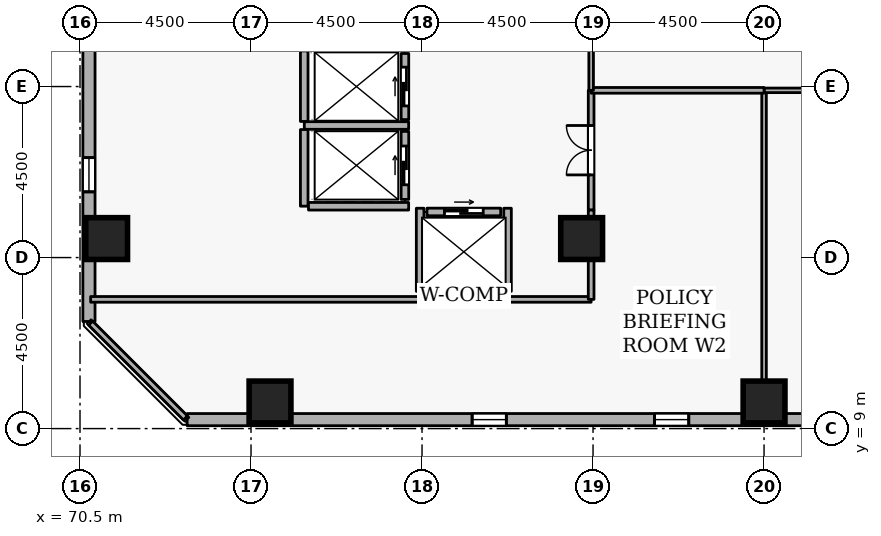
"""IFC4 building model, lengths in metres.
Left out: names, types, materials, properties, quantities, classifications, styles, units other than length and angle.
Written with IfcOpenShell. Run it as: python <this file> out.ifc"""

import sys

from ifc_helpers import new_model, si_unit, direction, frame, frame_2d, origin, origin_2d, place, context, subcontext, project, spatial, rectangle, extrude, element, fill, save


model = new_model("IFC4")
c1 = context("Model", 3, precision=1e-05, world=origin(), true_north=direction((0.0, 1.0)))
c2 = subcontext(c1, "Body", "Model", "MODEL_VIEW")
j1 = project(units=[si_unit("LENGTHUNIT", "METRE"), si_unit("PLANEANGLEUNIT", "RADIAN")], contexts=[c1])
p1 = place(None, origin())
s1 = spatial("IfcSite", under=j1, at=p1, CompositionType="ELEMENT")
p2 = place(p1, origin())
s2 = spatial("IfcBuilding", under=s1, at=p2, CompositionType="ELEMENT")
p3 = place(p2, frame((0.0, 0.0, 163.5)))
s3 = spatial("IfcBuildingStorey", under=s2, at=p3, CompositionType="ELEMENT", Elevation=163.5)
for number, where, z_axis, x_axis in (
    (1, (71.2, 14.0, 0.0), (0.0, 0.0, 1.0), (1.0, 0.0, 0.0)),
    (2, (88.5, 9.7, 0.0), (0.0, 0.0, 1.0), (1.0, 0.0, 0.0)),
    (3, (75.5, 9.7, 0.0), (0.0, 0.0, 1.0), (1.0, 0.0, 0.0)),
    (4, (83.7, 14.0, 0.0), (0.0, 0.0, 1.0), (1.0, 0.0, 0.0)),
):
    element("IfcColumn", number, at=place(p3, frame(where, z_axis=z_axis, x_axis=x_axis)), inside=s3, PredefinedType="COLUMN", context=c2, shape_type="SweptSolid", body=[
        extrude(rectangle(XDim=1.1, YDim=1.1, at=origin_2d()), origin(), (0.0, 0.0, 1.0), 3.6),
    ])
p4 = place(p3, frame((73.319, 9.235, 0.0), z_axis=(0.0, 0.0, 1.0), x_axis=(0.999999998513, 5.4540124e-05, 0.0)))
e5 = element("IfcWall", 5, at=p4, inside=s3, PredefinedType="STANDARD", context=c2, shape_type="SweptSolid", body=[
    extrude(rectangle(XDim=35.811, YDim=0.32, at=frame_2d((17.905, 0.0))), origin(), (0.0, 0.0, 1.0), 2.7),
])
p5 = place(p4, frame((7.5, 0.0, 0.72)))
e6 = element("IfcOpeningElement", 6, at=p5, cuts=e5, PredefinedType="OPENING", context=c2, shape_type="SweptSolid", body=[
    extrude(rectangle(XDim=0.9, YDim=1.75, at=frame_2d((0.45, 0.875))), frame((0.0, 0.17, 0.0), z_axis=(0.0, -1.0, 0.0), x_axis=(1.0, 0.0, 0.0)), (0.0, 0.0, 1.0), 0.34),
])
p6 = place(p4, frame((12.3, 0.0, 0.72)))
e7 = element("IfcOpeningElement", 7, at=p6, cuts=e5, PredefinedType="OPENING", context=c2, shape_type="SweptSolid", body=[
    extrude(rectangle(XDim=0.9, YDim=1.75, at=frame_2d((0.45, 0.875))), frame((0.0, 0.17, 0.0), z_axis=(0.0, -1.0, 0.0), x_axis=(1.0, 0.0, 0.0)), (0.0, 0.0, 1.0), 0.34),
])
p7 = place(p4, frame((17.1, 0.0, 0.72)))
e8 = element("IfcOpeningElement", 8, at=p7, cuts=e5, PredefinedType="OPENING", context=c2, shape_type="SweptSolid", body=[
    extrude(rectangle(XDim=0.9, YDim=1.75, at=frame_2d((0.45, 0.875))), frame((0.0, 0.17, 0.0), z_axis=(0.0, -1.0, 0.0), x_axis=(1.0, 0.0, 0.0)), (0.0, 0.0, 1.0), 0.34),
])
p8 = place(p4, frame((21.9, 0.0, 0.72)))
e9 = element("IfcOpeningElement", 9, at=p8, cuts=e5, PredefinedType="OPENING", context=c2, shape_type="SweptSolid", body=[
    extrude(rectangle(XDim=0.9, YDim=1.75, at=frame_2d((0.45, 0.875))), frame((0.0, 0.17, 0.0), z_axis=(0.0, -1.0, 0.0), x_axis=(1.0, 0.0, 0.0)), (0.0, 0.0, 1.0), 0.34),
])
p9 = place(p4, frame((31.5, 0.0, 0.72)))
e10 = element("IfcOpeningElement", 10, at=p9, cuts=e5, PredefinedType="OPENING", context=c2, shape_type="SweptSolid", body=[
    extrude(rectangle(XDim=0.9, YDim=1.75, at=frame_2d((0.45, 0.875))), frame((0.0, 0.17, 0.0), z_axis=(0.0, -1.0, 0.0), x_axis=(1.0, 0.0, 0.0)), (0.0, 0.0, 1.0), 0.34),
])
p10 = place(p3, frame((70.737, 47.629, 0.0), z_axis=(0.0, 0.0, 1.0), x_axis=(-5.4540124e-05, -0.999999998513, 0.0)))
e11 = element("IfcWall", 11, at=p10, inside=s3, PredefinedType="STANDARD", context=c2, shape_type="SweptSolid", body=[
    extrude(rectangle(XDim=35.811, YDim=0.32, at=frame_2d((17.905, 0.0))), origin(), (0.0, 0.0, 1.0), 2.7),
])
p11 = place(p10, frame((2.7, 0.0, 0.72)))
e12 = element("IfcOpeningElement", 12, at=p11, cuts=e11, PredefinedType="OPENING", context=c2, shape_type="SweptSolid", body=[
    extrude(rectangle(XDim=0.9, YDim=1.75, at=frame_2d((0.45, 0.875))), frame((0.0, 0.17, 0.0), z_axis=(0.0, -1.0, 0.0), x_axis=(1.0, 0.0, 0.0)), (0.0, 0.0, 1.0), 0.34),
])
p12 = place(p10, frame((12.3, 0.0, 0.72)))
e13 = element("IfcOpeningElement", 13, at=p12, cuts=e11, PredefinedType="OPENING", context=c2, shape_type="SweptSolid", body=[
    extrude(rectangle(XDim=0.9, YDim=1.75, at=frame_2d((0.45, 0.875))), frame((0.0, 0.17, 0.0), z_axis=(0.0, -1.0, 0.0), x_axis=(1.0, 0.0, 0.0)), (0.0, 0.0, 1.0), 0.34),
])
p13 = place(p10, frame((17.1, 0.0, 0.72)))
e14 = element("IfcOpeningElement", 14, at=p13, cuts=e11, PredefinedType="OPENING", context=c2, shape_type="SweptSolid", body=[
    extrude(rectangle(XDim=0.9, YDim=1.75, at=frame_2d((0.45, 0.875))), frame((0.0, 0.17, 0.0), z_axis=(0.0, -1.0, 0.0), x_axis=(1.0, 0.0, 0.0)), (0.0, 0.0, 1.0), 0.34),
])
p14 = place(p10, frame((21.9, 0.0, 0.72)))
e15 = element("IfcOpeningElement", 15, at=p14, cuts=e11, PredefinedType="OPENING", context=c2, shape_type="SweptSolid", body=[
    extrude(rectangle(XDim=0.9, YDim=1.75, at=frame_2d((0.45, 0.875))), frame((0.0, 0.17, 0.0), z_axis=(0.0, -1.0, 0.0), x_axis=(1.0, 0.0, 0.0)), (0.0, 0.0, 1.0), 0.34),
])
p15 = place(p10, frame((26.7, 0.0, 0.72)))
e16 = element("IfcOpeningElement", 16, at=p15, cuts=e11, PredefinedType="OPENING", context=c2, shape_type="SweptSolid", body=[
    extrude(rectangle(XDim=0.9, YDim=1.75, at=frame_2d((0.45, 0.875))), frame((0.0, 0.17, 0.0), z_axis=(0.0, -1.0, 0.0), x_axis=(1.0, 0.0, 0.0)), (0.0, 0.0, 1.0), 0.34),
])
p16 = place(p10, frame((31.5, 0.0, 0.72)))
e17 = element("IfcOpeningElement", 17, at=p16, cuts=e11, PredefinedType="OPENING", context=c2, shape_type="SweptSolid", body=[
    extrude(rectangle(XDim=0.9, YDim=1.75, at=frame_2d((0.45, 0.875))), frame((0.0, 0.17, 0.0), z_axis=(0.0, -1.0, 0.0), x_axis=(1.0, 0.0, 0.0)), (0.0, 0.0, 1.0), 0.34),
])
p17 = place(p3, frame((79.05, 17.13, 0.0), z_axis=(0.0, 0.0, 1.0), x_axis=(0.0, 1.0, 0.0)))
e18 = element("IfcWall", 18, at=p17, inside=s3, PredefinedType="STANDARD", context=c2, shape_type="SweptSolid", body=[
    extrude(rectangle(XDim=1.74, YDim=0.2, at=frame_2d((0.87, 0.0))), origin(), (0.0, 0.0, 1.0), 3.34),
])
p18 = place(p17, frame((0.36, 0.0, 0.0)))
e19 = element("IfcOpeningElement", 19, at=p18, cuts=e18, PredefinedType="OPENING", context=c2, shape_type="SweptSolid", body=[
    extrude(rectangle(XDim=1.02, YDim=2.06, at=frame_2d((0.51, 1.03))), frame((0.0, 0.11, 0.0), z_axis=(0.0, -1.0, 0.0), x_axis=(1.0, 0.0, 0.0)), (0.0, 0.0, 1.0), 0.22),
])
p19 = place(p3, frame((79.05, 15.03, 0.0), z_axis=(0.0, 0.0, 1.0), x_axis=(0.0, 1.0, 0.0)))
e20 = element("IfcWall", 20, at=p19, inside=s3, PredefinedType="STANDARD", context=c2, shape_type="SweptSolid", body=[
    extrude(rectangle(XDim=1.79, YDim=0.2, at=frame_2d((0.895, 0.0))), origin(), (0.0, 0.0, 1.0), 3.34),
])
p20 = place(p19, frame((0.385, 0.0, 0.0)))
e21 = element("IfcOpeningElement", 21, at=p20, cuts=e20, PredefinedType="OPENING", context=c2, shape_type="SweptSolid", body=[
    extrude(rectangle(XDim=1.02, YDim=2.06, at=frame_2d((0.51, 1.03))), frame((0.0, 0.11, 0.0), z_axis=(0.0, -1.0, 0.0), x_axis=(1.0, 0.0, 0.0)), (0.0, 0.0, 1.0), 0.22),
])
p21 = place(p3, frame((79.63, 14.7, 0.0), z_axis=(0.0, 0.0, 1.0), x_axis=(1.0, 0.0, 0.0)))
e22 = element("IfcWall", 22, at=p21, inside=s3, PredefinedType="STANDARD", context=c2, shape_type="SweptSolid", body=[
    extrude(rectangle(XDim=1.94, YDim=0.2, at=frame_2d((0.97, 0.0))), origin(), (0.0, 0.0, 1.0), 3.34),
])
p22 = place(p21, frame((0.46, 0.0, 0.0)))
e23 = element("IfcOpeningElement", 23, at=p22, cuts=e22, PredefinedType="OPENING", context=c2, shape_type="SweptSolid", body=[
    extrude(rectangle(XDim=1.02, YDim=2.06, at=frame_2d((0.51, 1.03))), frame((0.0, 0.11, 0.0), z_axis=(0.0, -1.0, 0.0), x_axis=(1.0, 0.0, 0.0)), (0.0, 0.0, 1.0), 0.22),
])
p23 = place(p3, frame((76.402, 16.975, 0.0), z_axis=(0.0, 0.0, 1.0), x_axis=(1.0, 0.0, 0.0)))
e24 = element("IfcWall", 24, at=p23, inside=s3, PredefinedType="STANDARD", context=c2, shape_type="SweptSolid", body=[
    extrude(rectangle(XDim=2.746, YDim=0.2, at=frame_2d((1.373, 0.0))), origin(), (0.0, 0.0, 1.0), 3.34),
])
p24 = place(p3, frame((76.4, 14.852, 0.0), z_axis=(0.0, 0.0, 1.0), x_axis=(0.0, 1.0, 0.0)))
e25 = element("IfcWall", 25, at=p24, inside=s3, PredefinedType="STANDARD", context=c2, shape_type="SweptSolid", body=[
    extrude(rectangle(XDim=2.016, YDim=0.2, at=frame_2d((1.008, 0.0))), origin(), (0.0, 0.0, 1.0), 3.34),
])
p25 = place(p3, frame((76.4, 17.082, 0.0), z_axis=(0.0, 0.0, 1.0), x_axis=(0.0, 1.0, 0.0)))
e26 = element("IfcWall", 26, at=p25, inside=s3, PredefinedType="STANDARD", context=c2, shape_type="SweptSolid", body=[
    extrude(rectangle(XDim=1.856, YDim=0.2, at=frame_2d((0.928, 0.0))), origin(), (0.0, 0.0, 1.0), 3.34),
])
p26 = place(p3, frame((76.512, 14.85, 0.0), z_axis=(0.0, 0.0, 1.0), x_axis=(1.0, 0.0, 0.0)))
e27 = element("IfcWall", 27, at=p26, inside=s3, PredefinedType="STANDARD", context=c2, shape_type="SweptSolid", body=[
    extrude(rectangle(XDim=2.636, YDim=0.2, at=frame_2d((1.318, 0.0))), origin(), (0.0, 0.0, 1.0), 3.34),
])
p27 = place(p3, frame((79.452, 12.5, 0.0), z_axis=(0.0, 0.0, 1.0), x_axis=(1.0, 0.0, 0.0)))
e28 = element("IfcWall", 28, at=p27, inside=s3, PredefinedType="STANDARD", context=c2, shape_type="SweptSolid", body=[
    extrude(rectangle(XDim=2.296, YDim=0.2, at=frame_2d((1.148, 0.0))), origin(), (0.0, 0.0, 1.0), 3.34),
])
for number, where, z_axis, x_axis in (
    (29, (81.75, 12.612, 0.0), (0.0, 0.0, 1.0), (0.0, 1.0, 0.0)),
    (30, (79.45, 12.612, 0.0), (0.0, 0.0, 1.0), (0.0, 1.0, 0.0)),
):
    element("IfcWall", number, at=place(p3, frame(where, z_axis=z_axis, x_axis=x_axis)), inside=s3, PredefinedType="STANDARD", context=c2, shape_type="SweptSolid", body=[
        extrude(rectangle(XDim=2.186, YDim=0.2, at=frame_2d((1.093, 0.0))), origin(), (0.0, 0.0, 1.0), 3.34),
    ])
p28 = place(p3, frame((88.5, 9.28, 0.0), z_axis=(0.0, 0.0, 1.0), x_axis=(0.0, 1.0, 0.0)))
e31 = element("IfcWall", 31, at=p28, inside=s3, PredefinedType="PARTITIONING", context=c2, shape_type="SweptSolid", body=[
    extrude(rectangle(XDim=8.62, YDim=0.12, at=frame_2d((4.31, 0.0))), origin(), (0.0, 0.0, 1.0), 2.878),
])
p29 = place(p3, frame((88.5, 17.9, 0.0), z_axis=(0.0, 0.0, 1.0), x_axis=(1.0, 0.0, 0.0)))
e32 = element("IfcWall", 32, at=p29, inside=s3, PredefinedType="PARTITIONING", context=c2, shape_type="SweptSolid", body=[
    extrude(rectangle(XDim=4.55, YDim=0.12, at=frame_2d((2.275, 0.0))), origin(), (0.0, 0.0, 1.0), 3.34),
])
p30 = place(p3, frame((83.95, 14.75, 0.0), z_axis=(0.0, 0.0, 1.0), x_axis=(0.0, 1.0, 0.0)))
e33 = element("IfcWall", 33, at=p30, inside=s3, PredefinedType="PARTITIONING", context=c2, shape_type="SweptSolid", body=[
    extrude(rectangle(XDim=3.15, YDim=0.15, at=frame_2d((1.575, 0.0))), origin(), (0.0, 0.0, 1.0), 3.34),
])
p31 = place(p30, frame((0.925, 0.0, 0.0)))
e34 = element("IfcOpeningElement", 34, at=p31, cuts=e33, PredefinedType="OPENING", context=c2, shape_type="SweptSolid", body=[
    extrude(rectangle(XDim=1.3, YDim=2.12, at=frame_2d((0.65, 1.06))), frame((0.0, 0.085, 0.0), z_axis=(0.0, -1.0, 0.0), x_axis=(1.0, 0.0, 0.0)), (0.0, 0.0, 1.0), 0.17),
])
p32 = place(p3, frame((83.95, 17.9, 0.0), z_axis=(0.0, 0.0, 1.0), x_axis=(1.0, 0.0, 0.0)))
e35 = element("IfcWall", 35, at=p32, inside=s3, PredefinedType="PARTITIONING", context=c2, shape_type="SweptSolid", body=[
    extrude(rectangle(XDim=4.55, YDim=0.15, at=frame_2d((2.275, 0.0))), origin(), (0.0, 0.0, 1.0), 3.34),
])
p33 = place(p3, frame((73.275, 9.28, 0.0), z_axis=(0.0, 0.0, 1.0), x_axis=(-0.707106781187, 0.707106781187, 0.0)))
e36 = element("IfcWall", 36, at=p33, inside=s3, PredefinedType="PARTITIONING", context=c2, shape_type="SweptSolid", body=[
    extrude(rectangle(XDim=3.528, YDim=0.15, at=frame_2d((1.764, 0.0))), origin(), (0.0, 0.0, 1.0), 3.34),
])
p34 = place(p3, frame((70.78, 12.4, 0.0), z_axis=(0.0, 0.0, 1.0), x_axis=(1.0, 0.0, 0.0)))
e37 = element("IfcWall", 37, at=p34, inside=s3, PredefinedType="PARTITIONING", context=c2, shape_type="SweptSolid", body=[
    extrude(rectangle(XDim=8.672, YDim=0.15, at=frame_2d((4.336, 0.0))), origin(), (0.0, 0.0, 1.0), 3.34),
])
p35 = place(p3, frame((81.748, 12.4, 0.0), z_axis=(0.0, 0.0, 1.0), x_axis=(1.0, 0.0, 0.0)))
e38 = element("IfcWall", 38, at=p35, inside=s3, PredefinedType="PARTITIONING", context=c2, shape_type="SweptSolid", body=[
    extrude(rectangle(XDim=2.202, YDim=0.15, at=frame_2d((1.101, 0.0))), origin(), (0.0, 0.0, 1.0), 3.34),
])
p36 = place(p3, frame((83.95, 12.4, 0.0), z_axis=(0.0, 0.0, 1.0), x_axis=(0.0, 1.0, 0.0)))
e39 = element("IfcWall", 39, at=p36, inside=s3, PredefinedType="PARTITIONING", context=c2, shape_type="SweptSolid", body=[
    extrude(rectangle(XDim=2.35, YDim=0.15, at=frame_2d((1.175, 0.0))), origin(), (0.0, 0.0, 1.0), 3.34),
])
p37 = place(p3, frame((83.95, 17.9, 0.0), z_axis=(0.0, 0.0, 1.0), x_axis=(0.0, 1.0, 0.0)))
e40 = element("IfcWall", 40, at=p37, inside=s3, PredefinedType="PARTITIONING", context=c2, shape_type="SweptSolid", body=[
    extrude(rectangle(XDim=4.5, YDim=0.12, at=frame_2d((2.25, 0.0))), origin(), (0.0, 0.0, 1.0), 3.34),
])
p38 = place(p37, frame((1.775, 0.0, 0.0)))
e41 = element("IfcOpeningElement", 41, at=p38, cuts=e40, PredefinedType="OPENING", context=c2, shape_type="SweptSolid", body=[
    extrude(rectangle(XDim=0.95, YDim=2.1, at=frame_2d((0.475, 1.05))), frame((0.0, 0.07, 0.0), z_axis=(0.0, -1.0, 0.0), x_axis=(1.0, 0.0, 0.0)), (0.0, 0.0, 1.0), 0.14),
])
p39 = place(p5, origin())
e42 = element("IfcWindow", 42, at=p39, inside=s3, PartitioningType="SINGLE_PANEL", PredefinedType="WINDOW", context=c2, shape_type="SweptSolid", body=[
    extrude(rectangle(XDim=0.9, YDim=1.75, at=frame_2d((0.45, 0.875))), frame((0.0, 0.03, 0.0), z_axis=(0.0, -1.0, 0.0), x_axis=(1.0, 0.0, 0.0)), (0.0, 0.0, 1.0), 0.06),
])
fill(e6, e42)
p40 = place(p6, origin())
e43 = element("IfcWindow", 43, at=p40, inside=s3, PartitioningType="SINGLE_PANEL", PredefinedType="WINDOW", context=c2, shape_type="SweptSolid", body=[
    extrude(rectangle(XDim=0.9, YDim=1.75, at=frame_2d((0.45, 0.875))), frame((0.0, 0.03, 0.0), z_axis=(0.0, -1.0, 0.0), x_axis=(1.0, 0.0, 0.0)), (0.0, 0.0, 1.0), 0.06),
])
fill(e7, e43)
p41 = place(p16, origin())
e44 = element("IfcWindow", 44, at=p41, inside=s3, PartitioningType="SINGLE_PANEL", PredefinedType="WINDOW", context=c2, shape_type="SweptSolid", body=[
    extrude(rectangle(XDim=0.9, YDim=1.75, at=frame_2d((0.45, 0.875))), frame((0.0, 0.03, 0.0), z_axis=(0.0, -1.0, 0.0), x_axis=(1.0, 0.0, 0.0)), (0.0, 0.0, 1.0), 0.06),
])
fill(e17, e44)
p42 = place(p18, origin())
e45 = element("IfcDoor", 45, at=p42, inside=s3, OperationType="SLIDING_TO_LEFT", PredefinedType="DOOR", context=c2, shape_type="SweptSolid", body=[
    extrude(rectangle(XDim=1.02, YDim=2.06, at=frame_2d((0.51, 1.03))), frame((0.0, 0.025, 0.0), z_axis=(0.0, -1.0, 0.0), x_axis=(1.0, 0.0, 0.0)), (0.0, 0.0, 1.0), 0.05),
])
fill(e19, e45)
p43 = place(p20, origin())
e46 = element("IfcDoor", 46, at=p43, inside=s3, OperationType="SLIDING_TO_LEFT", PredefinedType="DOOR", context=c2, shape_type="SweptSolid", body=[
    extrude(rectangle(XDim=1.02, YDim=2.06, at=frame_2d((0.51, 1.03))), frame((0.0, 0.025, 0.0), z_axis=(0.0, -1.0, 0.0), x_axis=(1.0, 0.0, 0.0)), (0.0, 0.0, 1.0), 0.05),
])
fill(e21, e46)
p44 = place(p22, origin())
e47 = element("IfcDoor", 47, at=p44, inside=s3, OperationType="SLIDING_TO_LEFT", PredefinedType="DOOR", context=c2, shape_type="SweptSolid", body=[
    extrude(rectangle(XDim=1.02, YDim=2.06, at=frame_2d((0.51, 1.03))), frame((0.0, 0.025, 0.0), z_axis=(0.0, -1.0, 0.0), x_axis=(1.0, 0.0, 0.0)), (0.0, 0.0, 1.0), 0.05),
])
fill(e23, e47)
p45 = place(p31, origin())
e48 = element("IfcDoor", 48, at=p45, inside=s3, OperationType="DOUBLE_DOOR_SINGLE_SWING", PredefinedType="DOOR", context=c2, shape_type="SweptSolid", body=[
    extrude(rectangle(XDim=1.3, YDim=2.12, at=frame_2d((0.65, 1.06))), frame((0.0, 0.025, 0.0), z_axis=(0.0, -1.0, 0.0), x_axis=(1.0, 0.0, 0.0)), (0.0, 0.0, 1.0), 0.05),
])
fill(e34, e48)
save(model, sys.argv[1])
